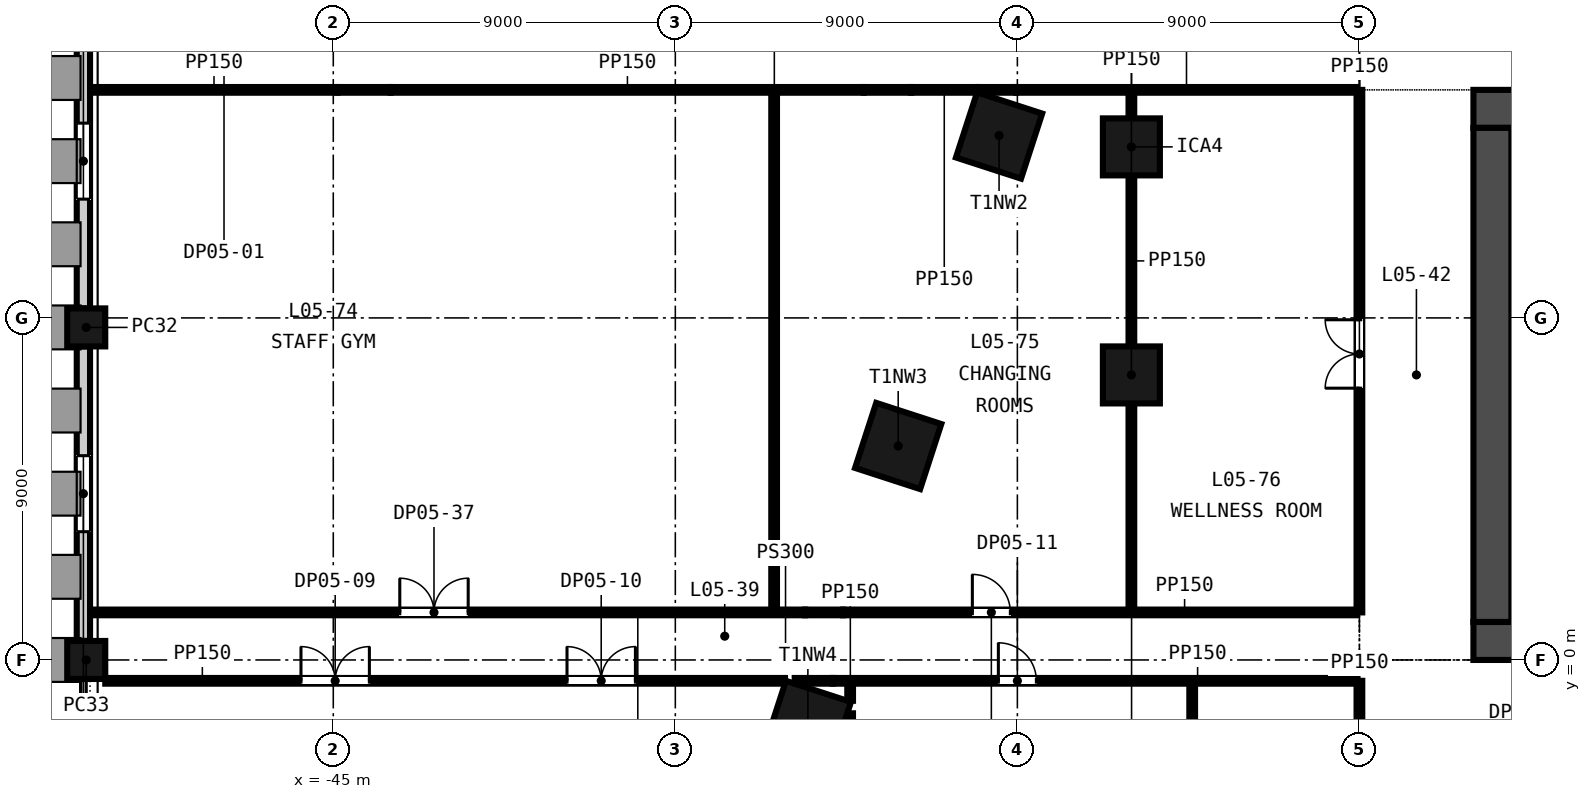
"""IFC4 building model, lengths in metres.
Left out: names, types, materials, properties, quantities, classifications, styles, units other than length and angle.
Written with IfcOpenShell. Run it as: python <this file> out.ifc"""

import sys

from ifc_helpers import new_model, si_unit, direction, frame, frame_2d, origin, origin_2d, place, context, subcontext, project, spatial, rectangle, extrude, element, fill, save


model = new_model("IFC4")
c1 = context("Model", 3, precision=1e-05, world=origin(), true_north=direction((0.0, 1.0)))
c2 = subcontext(c1, "Body", "Model", "MODEL_VIEW")
j1 = project(units=[si_unit("LENGTHUNIT", "METRE"), si_unit("PLANEANGLEUNIT", "RADIAN")], contexts=[c1])
p1 = place(None, origin())
s1 = spatial("IfcSite", under=j1, at=p1, CompositionType="ELEMENT")
p2 = place(p1, origin())
s2 = spatial("IfcBuilding", under=s1, at=p2, CompositionType="ELEMENT")
p3 = place(p2, frame((0.0, 0.0, 31.5)))
s3 = spatial("IfcBuildingStorey", under=s2, at=p3, CompositionType="ELEMENT", Elevation=31.5)
p4 = place(p3, frame((-15.0, 0.5, -0.3), z_axis=(0.0, 0.0, 1.0), x_axis=(1.0, 0.0, 0.0)))
e1 = element("IfcWall", 1, at=p4, inside=s3, PredefinedType="SOLIDWALL", context=c2, shape_type="SweptSolid", body=[
    extrude(rectangle(XDim=30.0, YDim=1.0, at=frame_2d((15.0, 0.0))), origin(), (0.0, 0.0, 1.0), 4.65),
])
p5 = place(p4, frame((5.8, 0.0, 0.3)))
e2 = element("IfcOpeningElement", 2, at=p5, cuts=e1, PredefinedType="OPENING", context=c2, shape_type="SweptSolid", body=[
    extrude(rectangle(XDim=2.4, YDim=2.4, at=frame_2d((1.2, 1.2))), frame((0.0, 0.51, 0.0), z_axis=(0.0, -1.0, 0.0), x_axis=(1.0, 0.0, 0.0)), (0.0, 0.0, 1.0), 1.02),
])
p6 = place(p4, frame((13.8, 0.0, 0.3)))
e3 = element("IfcOpeningElement", 3, at=p6, cuts=e1, PredefinedType="OPENING", context=c2, shape_type="SweptSolid", body=[
    extrude(rectangle(XDim=2.4, YDim=2.4, at=frame_2d((1.2, 1.2))), frame((0.0, 0.51, 0.0), z_axis=(0.0, -1.0, 0.0), x_axis=(1.0, 0.0, 0.0)), (0.0, 0.0, 1.0), 1.02),
])
p7 = place(p4, frame((21.8, 0.0, 0.3)))
e4 = element("IfcOpeningElement", 4, at=p7, cuts=e1, PredefinedType="OPENING", context=c2, shape_type="SweptSolid", body=[
    extrude(rectangle(XDim=2.4, YDim=2.4, at=frame_2d((1.2, 1.2))), frame((0.0, 0.51, 0.0), z_axis=(0.0, -1.0, 0.0), x_axis=(1.0, 0.0, 0.0)), (0.0, 0.0, 1.0), 1.02),
])
p8 = place(p4, frame((1.5, 0.0, 0.3)))
e5 = element("IfcOpeningElement", 5, at=p8, cuts=e1, PredefinedType="OPENING", context=c2, shape_type="SweptSolid", body=[
    extrude(rectangle(XDim=1.2, YDim=2.1, at=frame_2d((0.6, 1.05))), frame((0.0, 0.51, 0.0), z_axis=(0.0, -1.0, 0.0), x_axis=(1.0, 0.0, 0.0)), (0.0, 0.0, 1.0), 1.02),
])
p9 = place(p4, frame((27.3, 0.0, 0.3)))
e6 = element("IfcOpeningElement", 6, at=p9, cuts=e1, PredefinedType="OPENING", context=c2, shape_type="SweptSolid", body=[
    extrude(rectangle(XDim=1.2, YDim=2.1, at=frame_2d((0.6, 1.05))), frame((0.0, 0.51, 0.0), z_axis=(0.0, -1.0, 0.0), x_axis=(1.0, 0.0, 0.0)), (0.0, 0.0, 1.0), 1.02),
])
p10 = place(p3, frame((-15.0, 14.5, -0.3), z_axis=(0.0, 0.0, 1.0), x_axis=(1.0, 0.0, 0.0)))
e7 = element("IfcWall", 7, at=p10, inside=s3, PredefinedType="SOLIDWALL", context=c2, shape_type="SweptSolid", body=[
    extrude(rectangle(XDim=30.0, YDim=1.0, at=frame_2d((15.0, 0.0))), origin(), (0.0, 0.0, 1.0), 4.65),
])
p11 = place(p10, frame((9.25, 0.0, 0.3)))
e8 = element("IfcOpeningElement", 8, at=p11, cuts=e7, PredefinedType="OPENING", context=c2, shape_type="SweptSolid", body=[
    extrude(rectangle(XDim=1.5, YDim=2.1, at=frame_2d((0.75, 1.05))), frame((0.0, 0.51, 0.0), z_axis=(0.0, -1.0, 0.0), x_axis=(1.0, 0.0, 0.0)), (0.0, 0.0, 1.0), 1.02),
])
p12 = place(p10, frame((19.4, 0.0, 0.3)))
e9 = element("IfcOpeningElement", 9, at=p12, cuts=e7, PredefinedType="OPENING", context=c2, shape_type="SweptSolid", body=[
    extrude(rectangle(XDim=1.5, YDim=2.1, at=frame_2d((0.75, 1.05))), frame((0.0, 0.51, 0.0), z_axis=(0.0, -1.0, 0.0), x_axis=(1.0, 0.0, 0.0)), (0.0, 0.0, 1.0), 1.02),
])
p13 = place(p10, frame((1.5, 0.0, 0.3)))
e10 = element("IfcOpeningElement", 10, at=p13, cuts=e7, PredefinedType="OPENING", context=c2, shape_type="SweptSolid", body=[
    extrude(rectangle(XDim=1.2, YDim=2.1, at=frame_2d((0.6, 1.05))), frame((0.0, 0.51, 0.0), z_axis=(0.0, -1.0, 0.0), x_axis=(1.0, 0.0, 0.0)), (0.0, 0.0, 1.0), 1.02),
])
p14 = place(p10, frame((27.3, 0.0, 0.3)))
e11 = element("IfcOpeningElement", 11, at=p14, cuts=e7, PredefinedType="OPENING", context=c2, shape_type="SweptSolid", body=[
    extrude(rectangle(XDim=1.2, YDim=2.1, at=frame_2d((0.6, 1.05))), frame((0.0, 0.51, 0.0), z_axis=(0.0, -1.0, 0.0), x_axis=(1.0, 0.0, 0.0)), (0.0, 0.0, 1.0), 1.02),
])
p15 = place(p3, frame((-14.5, 1.0, -0.3), z_axis=(0.0, 0.0, 1.0), x_axis=(0.0, 1.0, 0.0)))
e12 = element("IfcWall", 12, at=p15, inside=s3, PredefinedType="SOLIDWALL", context=c2, shape_type="SweptSolid", body=[
    extrude(rectangle(XDim=13.0, YDim=1.0, at=frame_2d((6.5, 0.0))), origin(), (0.0, 0.0, 1.0), 4.65),
])
for number, where, z_axis, x_axis in (
    (13, (-27.482, 13.799, -0.3), (0.0, 0.0, 1.0), (-0.309, -0.951, 0.0)),
    (14, (-30.136, 5.63, -0.3), (0.0, 0.0, 1.0), (-0.309, -0.951, 0.0)),
    (15, (-32.512, -1.683, -0.3), (0.0, 0.0, 1.0), (-0.309, -0.951, 0.0)),
):
    element("IfcColumn", number, at=place(p3, frame(where, z_axis=z_axis, x_axis=x_axis)), inside=s3, PredefinedType="COLUMN", context=c2, shape_type="SweptSolid", body=[
        extrude(rectangle(XDim=1.8, YDim=1.8, at=origin_2d()), origin(), (0.0, 0.0, 1.0), 4.65),
    ])
for number, where, z_axis, x_axis in (
    (16, (-24.0, 7.5, -0.3), (0.0, 0.0, 1.0), (1.0, 0.0, 0.0)),
    (17, (-24.0, 13.5, -0.3), (0.0, 0.0, 1.0), (1.0, 0.0, 0.0)),
):
    element("IfcColumn", number, at=place(p3, frame(where, z_axis=z_axis, x_axis=x_axis)), inside=s3, PredefinedType="COLUMN", context=c2, shape_type="SweptSolid", body=[
        extrude(rectangle(XDim=1.5, YDim=1.5, at=origin_2d()), origin(), (0.0, 0.0, 1.0), 4.65),
    ])
for number, where, z_axis, x_axis in (
    (18, (-51.5, 8.75, -0.3), (0.0, 0.0, 1.0), (0.0, -1.0, 0.0)),
    (19, (-51.5, 0.0, -0.3), (0.0, 0.0, 1.0), (0.0, -1.0, 0.0)),
):
    element("IfcColumn", number, at=place(p3, frame(where, z_axis=z_axis, x_axis=x_axis)), inside=s3, PredefinedType="COLUMN", context=c2, shape_type="SweptSolid", body=[
        extrude(rectangle(XDim=1.0, YDim=1.0, at=origin_2d()), origin(), (0.0, 0.0, 1.0), 4.65),
    ])
p16 = place(p3, frame((-51.575, 17.0, -0.3), z_axis=(0.0, 0.0, 1.0), x_axis=(0.0, -1.0, 0.0)))
e20 = element("IfcWall", 20, at=p16, inside=s3, PredefinedType="SOLIDWALL", context=c2, shape_type="SweptSolid", body=[
    extrude(rectangle(XDim=7.75, YDim=0.35, at=frame_2d((3.875, 0.0))), origin(), (0.0, 0.0, 1.0), 3.75),
])
p17 = place(p16, frame((2.875, 0.0, 1.2)))
e21 = element("IfcOpeningElement", 21, at=p17, cuts=e20, PredefinedType="OPENING", context=c2, shape_type="SweptSolid", body=[
    extrude(rectangle(XDim=2.0, YDim=2.5, at=frame_2d((1.0, 1.25))), frame((0.0, 0.185, 0.0), z_axis=(0.0, -1.0, 0.0), x_axis=(1.0, 0.0, 0.0)), (0.0, 0.0, 1.0), 0.37),
])
p18 = place(p3, frame((-51.575, 8.25, -0.3), z_axis=(0.0, 0.0, 1.0), x_axis=(0.0, -1.0, 0.0)))
e22 = element("IfcWall", 22, at=p18, inside=s3, PredefinedType="SOLIDWALL", context=c2, shape_type="SweptSolid", body=[
    extrude(rectangle(XDim=7.75, YDim=0.35, at=frame_2d((3.875, 0.0))), origin(), (0.0, 0.0, 1.0), 3.75),
])
p19 = place(p18, frame((2.875, 0.0, 1.2)))
e23 = element("IfcOpeningElement", 23, at=p19, cuts=e22, PredefinedType="OPENING", context=c2, shape_type="SweptSolid", body=[
    extrude(rectangle(XDim=2.0, YDim=2.5, at=frame_2d((1.0, 1.25))), frame((0.0, 0.185, 0.0), z_axis=(0.0, -1.0, 0.0), x_axis=(1.0, 0.0, 0.0)), (0.0, 0.0, 1.0), 0.37),
])
p20 = place(p3, frame((-51.0, -0.549, 0.0), z_axis=(0.0, 0.0, 1.0), x_axis=(1.0, 0.0, 0.0)))
e24 = element("IfcWall", 24, at=p20, inside=s3, PredefinedType="PARTITIONING", context=c2, shape_type="SweptSolid", body=[
    extrude(rectangle(XDim=17.886, YDim=0.15, at=frame_2d((8.943, 0.0))), origin(), (0.0, 0.0, 1.0), 4.35),
])
p21 = place(p20, frame((5.15, 0.0, 0.0)))
e25 = element("IfcOpeningElement", 25, at=p21, cuts=e24, PredefinedType="OPENING", context=c2, shape_type="SweptSolid", body=[
    extrude(rectangle(XDim=1.8, YDim=2.4, at=frame_2d((0.9, 1.2))), frame((0.0, 0.085, 0.0), z_axis=(0.0, -1.0, 0.0), x_axis=(1.0, 0.0, 0.0)), (0.0, 0.0, 1.0), 0.17),
])
p22 = place(p20, frame((12.15, 0.0, 0.0)))
e26 = element("IfcOpeningElement", 26, at=p22, cuts=e24, PredefinedType="OPENING", context=c2, shape_type="SweptSolid", body=[
    extrude(rectangle(XDim=1.8, YDim=2.4, at=frame_2d((0.9, 1.2))), frame((0.0, 0.085, 0.0), z_axis=(0.0, -1.0, 0.0), x_axis=(1.0, 0.0, 0.0)), (0.0, 0.0, 1.0), 0.17),
])
p23 = place(p3, frame((-32.859, -0.549, 0.0), z_axis=(0.0, 0.0, 1.0), x_axis=(1.0, 0.0, 0.0)))
e27 = element("IfcWall", 27, at=p23, inside=s3, PredefinedType="PARTITIONING", context=c2, shape_type="SweptSolid", body=[
    extrude(rectangle(XDim=1.0, YDim=0.15, at=frame_2d((0.5, 0.0))), origin(), (0.0, 0.0, 1.0), 3.5),
])
p24 = place(p3, frame((-31.859, -0.549, 0.0), z_axis=(0.0, 0.0, 1.0), x_axis=(1.0, 0.0, 0.0)))
e28 = element("IfcWall", 28, at=p24, inside=s3, PredefinedType="PARTITIONING", context=c2, shape_type="SweptSolid", body=[
    extrude(rectangle(XDim=13.784, YDim=0.15, at=frame_2d((6.892, 0.0))), origin(), (0.0, 0.0, 1.0), 4.35),
])
p25 = place(p24, frame((4.359, 0.0, 0.0)))
e29 = element("IfcOpeningElement", 29, at=p25, cuts=e28, PredefinedType="OPENING", context=c2, shape_type="SweptSolid", body=[
    extrude(rectangle(XDim=1.0, YDim=2.1, at=frame_2d((0.5, 1.05))), frame((0.0, 0.085, 0.0), z_axis=(0.0, -1.0, 0.0), x_axis=(1.0, 0.0, 0.0)), (0.0, 0.0, 1.0), 0.17),
])
p26 = place(p3, frame((-51.4, 1.251, 0.0), z_axis=(0.0, 0.0, 1.0), x_axis=(1.0, 0.0, 0.0)))
e30 = element("IfcWall", 30, at=p26, inside=s3, PredefinedType="PARTITIONING", context=c2, shape_type="SweptSolid", body=[
    extrude(rectangle(XDim=18.815, YDim=0.15, at=frame_2d((9.408, 0.0))), origin(), (0.0, 0.0, 1.0), 4.35),
])
p27 = place(p26, frame((8.15, 0.0, 0.0)))
e31 = element("IfcOpeningElement", 31, at=p27, cuts=e30, PredefinedType="OPENING", context=c2, shape_type="SweptSolid", body=[
    extrude(rectangle(XDim=1.8, YDim=2.4, at=frame_2d((0.9, 1.2))), frame((0.0, 0.085, 0.0), z_axis=(0.0, -1.0, 0.0), x_axis=(1.0, 0.0, 0.0)), (0.0, 0.0, 1.0), 0.17),
])
p28 = place(p3, frame((-32.584, 1.251, 0.0), z_axis=(0.0, 0.0, 1.0), x_axis=(1.0, 0.0, 0.0)))
e32 = element("IfcWall", 32, at=p28, inside=s3, PredefinedType="PARTITIONING", context=c2, shape_type="SweptSolid", body=[
    extrude(rectangle(XDim=1.0, YDim=0.15, at=frame_2d((0.5, 0.0))), origin(), (0.0, 0.0, 1.0), 3.5),
])
p29 = place(p3, frame((-31.584, 1.251, 0.0), z_axis=(0.0, 0.0, 1.0), x_axis=(1.0, 0.0, 0.0)))
e33 = element("IfcWall", 33, at=p29, inside=s3, PredefinedType="PARTITIONING", context=c2, shape_type="SweptSolid", body=[
    extrude(rectangle(XDim=13.51, YDim=0.15, at=frame_2d((6.755, 0.0))), origin(), (0.0, 0.0, 1.0), 4.35),
])
p30 = place(p29, frame((3.4, 0.0, 0.0)))
e34 = element("IfcOpeningElement", 34, at=p30, cuts=e33, PredefinedType="OPENING", context=c2, shape_type="SweptSolid", body=[
    extrude(rectangle(XDim=1.0, YDim=2.1, at=frame_2d((0.5, 1.05))), frame((0.0, 0.085, 0.0), z_axis=(0.0, -1.0, 0.0), x_axis=(1.0, 0.0, 0.0)), (0.0, 0.0, 1.0), 0.17),
])
p31 = place(p3, frame((-51.4, 15.0, 0.0), z_axis=(0.0, 0.0, 1.0), x_axis=(1.0, 0.0, 0.0)))
e35 = element("IfcWall", 35, at=p31, inside=s3, PredefinedType="PARTITIONING", context=c2, shape_type="SweptSolid", body=[
    extrude(rectangle(XDim=6.514, YDim=0.15, at=frame_2d((3.257, 0.0))), origin(), (0.0, 0.0, 1.0), 4.35),
])
p32 = place(p3, frame((-44.886, 15.0, 0.0), z_axis=(0.0, 0.0, 1.0), x_axis=(1.0, 0.0, 0.0)))
e36 = element("IfcWall", 36, at=p32, inside=s3, PredefinedType="PARTITIONING", context=c2, shape_type="SweptSolid", body=[
    extrude(rectangle(XDim=1.395, YDim=0.15, at=frame_2d((0.697, 0.0))), origin(), (0.0, 0.0, 1.0), 3.369),
])
p33 = place(p3, frame((-43.491, 15.0, 0.0), z_axis=(0.0, 0.0, 1.0), x_axis=(1.0, 0.0, 0.0)))
e37 = element("IfcWall", 37, at=p33, inside=s3, PredefinedType="PARTITIONING", context=c2, shape_type="SweptSolid", body=[
    extrude(rectangle(XDim=12.452, YDim=0.15, at=frame_2d((6.226, 0.0))), origin(), (0.0, 0.0, 1.0), 4.35),
])
p34 = place(p3, frame((-31.039, 15.0, 0.0), z_axis=(0.0, 0.0, 1.0), x_axis=(1.0, 0.0, 0.0)))
e38 = element("IfcWall", 38, at=p34, inside=s3, PredefinedType="PARTITIONING", context=c2, shape_type="SweptSolid", body=[
    extrude(rectangle(XDim=1.244, YDim=0.15, at=frame_2d((0.622, 0.0))), origin(), (0.0, 0.0, 1.0), 3.261),
])
p35 = place(p3, frame((-29.795, 15.0, 0.0), z_axis=(0.0, 0.0, 1.0), x_axis=(1.0, 0.0, 0.0)))
e39 = element("IfcWall", 39, at=p35, inside=s3, PredefinedType="PARTITIONING", context=c2, shape_type="SweptSolid", body=[
    extrude(rectangle(XDim=1.733, YDim=0.15, at=frame_2d((0.867, 0.0))), origin(), (0.0, 0.0, 1.0), 4.35),
])
p36 = place(p3, frame((-28.035, 15.0, 0.0), z_axis=(0.0, 0.0, 1.0), x_axis=(1.0, 0.0, 0.0)))
e40 = element("IfcWall", 40, at=p36, inside=s3, PredefinedType="PARTITIONING", context=c2, shape_type="SweptSolid", body=[
    extrude(rectangle(XDim=1.0, YDim=0.15, at=frame_2d((0.5, 0.0))), origin(), (0.0, 0.0, 1.0), 3.5),
])
p37 = place(p3, frame((-27.035, 15.0, 0.0), z_axis=(0.0, 0.0, 1.0), x_axis=(1.0, 0.0, 0.0)))
e41 = element("IfcWall", 41, at=p37, inside=s3, PredefinedType="PARTITIONING", context=c2, shape_type="SweptSolid", body=[
    extrude(rectangle(XDim=8.96, YDim=0.15, at=frame_2d((4.48, 0.0))), origin(), (0.0, 0.0, 1.0), 4.35),
])
p38 = place(p3, frame((-33.4, 1.326, 0.0), z_axis=(0.0, 0.0, 1.0), x_axis=(0.0, 1.0, 0.0)))
e42 = element("IfcWall", 42, at=p38, inside=s3, PredefinedType="PARTITIONING", context=c2, shape_type="SweptSolid", body=[
    extrude(rectangle(XDim=13.599, YDim=0.15, at=frame_2d((6.8, 0.0))), origin(), (0.0, 0.0, 1.0), 4.35),
])
p39 = place(p3, frame((-31.4, -5.884, 0.0), z_axis=(0.0, 0.0, 1.0), x_axis=(0.0, 1.0, 0.0)))
e43 = element("IfcWall", 43, at=p39, inside=s3, PredefinedType="PARTITIONING", context=c2, shape_type="SweptSolid", body=[
    extrude(rectangle(XDim=4.48, YDim=0.15, at=frame_2d((2.24, 0.0))), origin(), (0.0, 0.0, 1.0), 4.35),
])
p40 = place(p3, frame((-31.4, -1.074, 0.0), z_axis=(0.0, 0.0, 1.0), x_axis=(0.0, 1.0, 0.0)))
e44 = element("IfcWall", 44, at=p40, inside=s3, PredefinedType="PARTITIONING", context=c2, shape_type="SweptSolid", body=[
    extrude(rectangle(XDim=0.45, YDim=0.15, at=frame_2d((0.225, 0.0))), origin(), (0.0, 0.0, 1.0), 4.35),
])
p41 = place(p3, frame((-24.0, 1.326, 0.0), z_axis=(0.0, 0.0, 1.0), x_axis=(0.0, 1.0, 0.0)))
e45 = element("IfcWall", 45, at=p41, inside=s3, PredefinedType="PARTITIONING", context=c2, shape_type="SweptSolid", body=[
    extrude(rectangle(XDim=5.424, YDim=0.15, at=frame_2d((2.712, 0.0))), origin(), (0.0, 0.0, 1.0), 3.591),
])
p42 = place(p3, frame((-24.0, 8.25, 0.0), z_axis=(0.0, 0.0, 1.0), x_axis=(0.0, 1.0, 0.0)))
e46 = element("IfcWall", 46, at=p42, inside=s3, PredefinedType="PARTITIONING", context=c2, shape_type="SweptSolid", body=[
    extrude(rectangle(XDim=4.5, YDim=0.15, at=frame_2d((2.25, 0.0))), origin(), (0.0, 0.0, 1.0), 3.817),
])
p43 = place(p3, frame((-24.0, 14.25, 0.0), z_axis=(0.0, 0.0, 1.0), x_axis=(0.0, 1.0, 0.0)))
e47 = element("IfcWall", 47, at=p43, inside=s3, PredefinedType="PARTITIONING", context=c2, shape_type="SweptSolid", body=[
    extrude(rectangle(XDim=0.675, YDim=0.15, at=frame_2d((0.337, 0.0))), origin(), (0.0, 0.0, 1.0), 3.747),
])
p44 = place(p3, frame((-22.4, -15.414, 0.0), z_axis=(0.0, 0.0, 1.0), x_axis=(0.0, 1.0, 0.0)))
e48 = element("IfcWall", 48, at=p44, inside=s3, PredefinedType="PARTITIONING", context=c2, shape_type="SweptSolid", body=[
    extrude(rectangle(XDim=14.79, YDim=0.15, at=frame_2d((7.395, 0.0))), origin(), (0.0, 0.0, 1.0), 4.35),
])
p45 = place(p3, frame((-18.0, -3.2, 0.0), z_axis=(0.0, 0.0, 1.0), x_axis=(0.0, 1.0, 0.0)))
e49 = element("IfcWall", 49, at=p45, inside=s3, PredefinedType="PARTITIONING", context=c2, shape_type="SweptSolid", body=[
    extrude(rectangle(XDim=2.651, YDim=0.15, at=frame_2d((1.326, 0.0))), origin(), (0.0, 0.0, 1.0), 4.35),
])
p46 = place(p3, frame((-18.0, 1.251, 0.0), z_axis=(0.0, 0.0, 1.0), x_axis=(0.0, 1.0, 0.0)))
e50 = element("IfcWall", 50, at=p46, inside=s3, PredefinedType="PARTITIONING", context=c2, shape_type="SweptSolid", body=[
    extrude(rectangle(XDim=13.749, YDim=0.15, at=frame_2d((6.875, 0.0))), origin(), (0.0, 0.0, 1.0), 4.35),
])
p47 = place(p46, frame((5.9, 0.0, 0.0)))
e51 = element("IfcOpeningElement", 51, at=p47, cuts=e50, PredefinedType="OPENING", context=c2, shape_type="SweptSolid", body=[
    extrude(rectangle(XDim=1.8, YDim=2.4, at=frame_2d((0.9, 1.2))), frame((0.0, 0.085, 0.0), z_axis=(0.0, -1.0, 0.0), x_axis=(1.0, 0.0, 0.0)), (0.0, 0.0, 1.0), 0.17),
])
p48 = place(p17, origin())
e52 = element("IfcWindow", 52, at=p48, inside=s3, PartitioningType="SINGLE_PANEL", PredefinedType="WINDOW", context=c2, shape_type="SweptSolid", body=[
    extrude(rectangle(XDim=2.0, YDim=2.5, at=frame_2d((1.0, 1.25))), frame((0.0, 0.03, 0.0), z_axis=(0.0, -1.0, 0.0), x_axis=(1.0, 0.0, 0.0)), (0.0, 0.0, 1.0), 0.06),
])
fill(e21, e52)
p49 = place(p19, origin())
e53 = element("IfcWindow", 53, at=p49, inside=s3, PartitioningType="SINGLE_PANEL", PredefinedType="WINDOW", context=c2, shape_type="SweptSolid", body=[
    extrude(rectangle(XDim=2.0, YDim=2.5, at=frame_2d((1.0, 1.25))), frame((0.0, 0.03, 0.0), z_axis=(0.0, -1.0, 0.0), x_axis=(1.0, 0.0, 0.0)), (0.0, 0.0, 1.0), 0.06),
])
fill(e23, e53)
p50 = place(p21, origin())
e54 = element("IfcDoor", 54, at=p50, inside=s3, OperationType="SINGLE_SWING_LEFT", PredefinedType="DOOR", context=c2, shape_type="SweptSolid", body=[
    extrude(rectangle(XDim=1.8, YDim=2.4, at=frame_2d((0.9, 1.2))), frame((0.0, 0.025, 0.0), z_axis=(0.0, -1.0, 0.0), x_axis=(1.0, 0.0, 0.0)), (0.0, 0.0, 1.0), 0.05),
])
fill(e25, e54)
p51 = place(p22, origin())
e55 = element("IfcDoor", 55, at=p51, inside=s3, OperationType="SINGLE_SWING_LEFT", PredefinedType="DOOR", context=c2, shape_type="SweptSolid", body=[
    extrude(rectangle(XDim=1.8, YDim=2.4, at=frame_2d((0.9, 1.2))), frame((0.0, 0.025, 0.0), z_axis=(0.0, -1.0, 0.0), x_axis=(1.0, 0.0, 0.0)), (0.0, 0.0, 1.0), 0.05),
])
fill(e26, e55)
p52 = place(p25, origin())
e56 = element("IfcDoor", 56, at=p52, inside=s3, OperationType="SINGLE_SWING_LEFT", PredefinedType="DOOR", context=c2, shape_type="SweptSolid", body=[
    extrude(rectangle(XDim=1.0, YDim=2.1, at=frame_2d((0.5, 1.05))), frame((0.0, 0.025, 0.0), z_axis=(0.0, -1.0, 0.0), x_axis=(1.0, 0.0, 0.0)), (0.0, 0.0, 1.0), 0.05),
])
fill(e29, e56)
p53 = place(p27, origin())
e57 = element("IfcDoor", 57, at=p53, inside=s3, OperationType="SINGLE_SWING_LEFT", PredefinedType="DOOR", context=c2, shape_type="SweptSolid", body=[
    extrude(rectangle(XDim=1.8, YDim=2.4, at=frame_2d((0.9, 1.2))), frame((0.0, 0.025, 0.0), z_axis=(0.0, -1.0, 0.0), x_axis=(1.0, 0.0, 0.0)), (0.0, 0.0, 1.0), 0.05),
])
fill(e31, e57)
p54 = place(p30, origin())
e58 = element("IfcDoor", 58, at=p54, inside=s3, OperationType="SINGLE_SWING_LEFT", PredefinedType="DOOR", context=c2, shape_type="SweptSolid", body=[
    extrude(rectangle(XDim=1.0, YDim=2.1, at=frame_2d((0.5, 1.05))), frame((0.0, 0.025, 0.0), z_axis=(0.0, -1.0, 0.0), x_axis=(1.0, 0.0, 0.0)), (0.0, 0.0, 1.0), 0.05),
])
fill(e34, e58)
p55 = place(p47, origin())
e59 = element("IfcDoor", 59, at=p55, inside=s3, OperationType="SINGLE_SWING_LEFT", PredefinedType="DOOR", context=c2, shape_type="SweptSolid", body=[
    extrude(rectangle(XDim=1.8, YDim=2.4, at=frame_2d((0.9, 1.2))), frame((0.0, 0.025, 0.0), z_axis=(0.0, -1.0, 0.0), x_axis=(1.0, 0.0, 0.0)), (0.0, 0.0, 1.0), 0.05),
])
fill(e51, e59)
save(model, sys.argv[1])
